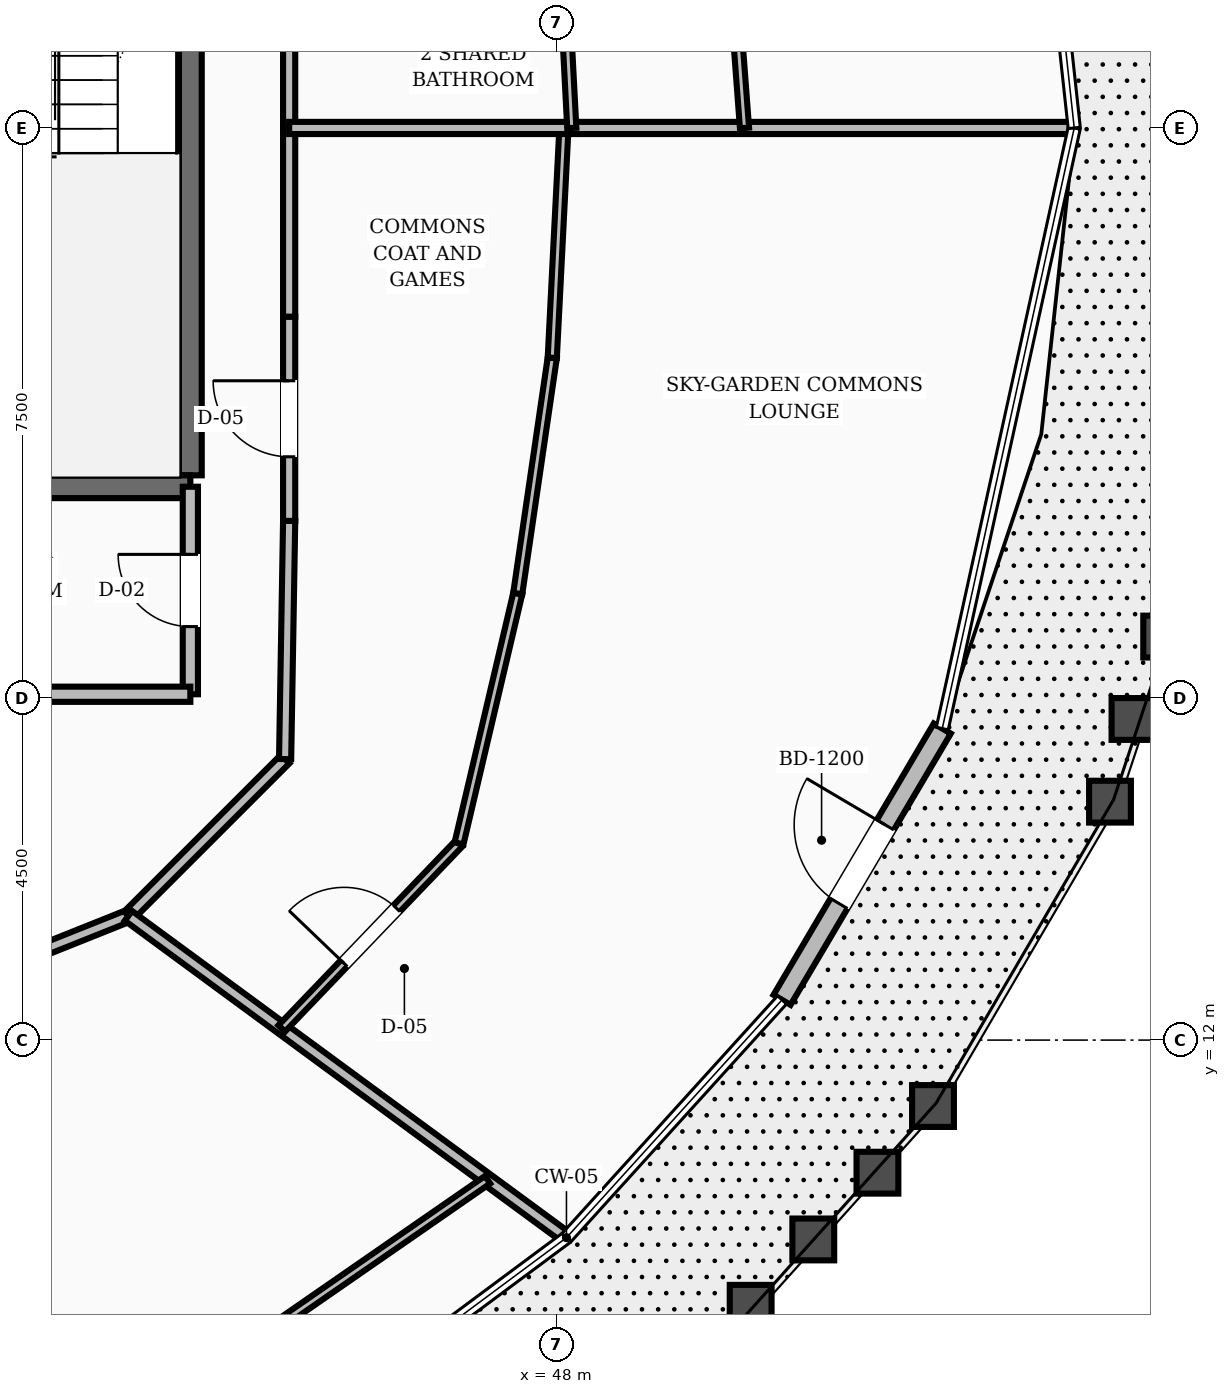
"""IFC4 building model, lengths in metres.
Left out: names, types, materials, properties, quantities, classifications, styles, units other than length and angle.
Written with IfcOpenShell. Run it as: python <this file> out.ifc"""

import sys

from ifc_helpers import new_model, si_unit, direction, frame, frame_2d, origin, place, context, subcontext, project, spatial, rectangle, extrude, element, fill, save


model = new_model("IFC4")
c1 = context("Model", 3, precision=1e-05, world=origin(), true_north=direction((0.0, 1.0)))
c2 = subcontext(c1, "Body", "Model", "MODEL_VIEW")
j1 = project(units=[si_unit("LENGTHUNIT", "METRE"), si_unit("PLANEANGLEUNIT", "RADIAN")], contexts=[c1])
p1 = place(None, origin())
s1 = spatial("IfcSite", under=j1, at=p1, CompositionType="ELEMENT")
p2 = place(p1, origin())
s2 = spatial("IfcBuilding", under=s1, at=p2, CompositionType="ELEMENT")
p3 = place(p2, frame((0.0, 0.0, 218.4)))
s3 = spatial("IfcBuildingStorey", under=s2, at=p3, CompositionType="ELEMENT", Elevation=218.4)
p4 = place(p3, frame((43.18, 19.43, 0.0), z_axis=(0.0, 0.0, 1.0), x_axis=(0.0, 1.0, 0.0)))
e1 = element("IfcWall", 1, at=p4, inside=s3, PredefinedType="SHEAR", context=c2, shape_type="SweptSolid", body=[
    extrude(rectangle(XDim=8.74, YDim=0.3, at=frame_2d((4.37, 0.0))), origin(), (0.0, 0.0, 1.0), 3.6),
])
p5 = place(p3, frame((39.58, 19.28, 0.0), z_axis=(0.0, 0.0, 1.0), x_axis=(1.0, 0.0, 0.0)))
e2 = element("IfcWall", 2, at=p5, inside=s3, PredefinedType="SHEAR", context=c2, shape_type="SweptSolid", body=[
    extrude(rectangle(XDim=3.6, YDim=0.3, at=frame_2d((1.8, 0.0))), origin(), (0.0, 0.0, 1.0), 3.6),
])
p6 = place(p3, frame((50.965, 12.529, 0.0), z_axis=(0.0, 0.0, 1.0), x_axis=(0.508481273456, 0.861073048321, 0.0)))
e3 = element("IfcWall", 3, at=p6, inside=s3, PredefinedType="STANDARD", context=c2, shape_type="SweptSolid", body=[
    extrude(rectangle(XDim=4.146, YDim=0.26, at=frame_2d((2.073, 0.0))), origin(), (0.0, 0.0, 1.0), 2.88),
])
p7 = place(p6, frame((1.473, 0.0, 0.0)))
e4 = element("IfcOpeningElement", 4, at=p7, cuts=e3, PredefinedType="OPENING", context=c2, shape_type="SweptSolid", body=[
    extrude(rectangle(XDim=1.2, YDim=2.15, at=frame_2d((0.6, 1.075))), frame((0.0, 0.14, 0.0), z_axis=(0.0, -1.0, 0.0), x_axis=(1.0, 0.0, 0.0)), (0.0, 0.0, 1.0), 0.28),
])
p8 = place(p3, frame((43.18, 16.55, 0.0), z_axis=(0.0, 0.0, 1.0), x_axis=(0.0, 1.0, 0.0)))
e5 = element("IfcWall", 5, at=p8, inside=s3, PredefinedType="SOLIDWALL", context=c2, shape_type="SweptSolid", body=[
    extrude(rectangle(XDim=2.73, YDim=0.2, at=frame_2d((1.365, 0.0))), origin(), (0.0, 0.0, 1.0), 2.87),
])
p9 = place(p8, frame((0.89, 0.0, 0.0)))
e6 = element("IfcOpeningElement", 6, at=p9, cuts=e5, PredefinedType="OPENING", context=c2, shape_type="SweptSolid", body=[
    extrude(rectangle(XDim=0.95, YDim=2.1, at=frame_2d((0.475, 1.05))), frame((0.0, 0.11, 0.0), z_axis=(0.0, -1.0, 0.0), x_axis=(1.0, 0.0, 0.0)), (0.0, 0.0, 1.0), 0.22),
])
p10 = place(p3, frame((39.2, 16.55, 0.0), z_axis=(0.0, 0.0, 1.0), x_axis=(1.0, 0.0, 0.0)))
e7 = element("IfcWall", 7, at=p10, inside=s3, PredefinedType="SOLIDWALL", context=c2, shape_type="SweptSolid", body=[
    extrude(rectangle(XDim=3.98, YDim=0.2, at=frame_2d((1.99, 0.0))), origin(), (0.0, 0.0, 1.0), 2.87),
])
p11 = place(p3, frame((44.48, 24.0, 0.0), z_axis=(0.0, 0.0, 1.0), x_axis=(0.0, 1.0, 0.0)))
e8 = element("IfcWall", 8, at=p11, inside=s3, PredefinedType="SOLIDWALL", context=c2, shape_type="SweptSolid", body=[
    extrude(rectangle(XDim=2.482, YDim=0.16, at=frame_2d((1.241, 0.0))), origin(), (0.0, 0.0, 1.0), 2.87),
])
p12 = place(p3, frame((39.651, 12.55, 0.0), z_axis=(0.0, 0.0, 1.0), x_axis=(0.92856882165, 0.371160266542, 0.0)))
e9 = element("IfcWall", 9, at=p12, inside=s3, PredefinedType="SOLIDWALL", context=c2, shape_type="SweptSolid", body=[
    extrude(rectangle(XDim=2.923, YDim=0.16, at=frame_2d((1.461, 0.0))), origin(), (0.0, 0.0, 1.0), 2.87),
])
p13 = place(p3, frame((42.365, 13.635, 0.0), z_axis=(0.0, 0.0, 1.0), x_axis=(0.707106781187, 0.707106781187, 0.0)))
e10 = element("IfcWall", 10, at=p13, inside=s3, PredefinedType="SOLIDWALL", context=c2, shape_type="SweptSolid", body=[
    extrude(rectangle(XDim=2.916, YDim=0.16, at=frame_2d((1.458, 0.0))), origin(), (0.0, 0.0, 1.0), 2.87),
])
p14 = place(p3, frame((44.427, 15.697, 0.0), z_axis=(0.0, 0.0, 1.0), x_axis=(0.016981035134, 0.999855811828, 0.0)))
e11 = element("IfcWall", 11, at=p14, inside=s3, PredefinedType="SOLIDWALL", context=c2, shape_type="SweptSolid", body=[
    extrude(rectangle(XDim=3.134, YDim=0.16, at=frame_2d((1.567, 0.0))), origin(), (0.0, 0.0, 1.0), 2.87),
])
p15 = place(p3, frame((44.48, 18.831, 0.0), z_axis=(0.0, 0.0, 1.0), x_axis=(0.0, 1.0, 0.0)))
e12 = element("IfcWall", 12, at=p15, inside=s3, PredefinedType="SOLIDWALL", context=c2, shape_type="SweptSolid", body=[
    extrude(rectangle(XDim=2.687, YDim=0.16, at=frame_2d((1.344, 0.0))), origin(), (0.0, 0.0, 1.0), 2.87),
])
p16 = place(p15, frame((0.844, 0.0, 0.0)))
e13 = element("IfcOpeningElement", 13, at=p16, cuts=e12, PredefinedType="OPENING", context=c2, shape_type="SweptSolid", body=[
    extrude(rectangle(XDim=1.0, YDim=2.1, at=frame_2d((0.5, 1.05))), frame((0.0, 0.09, 0.0), z_axis=(0.0, -1.0, 0.0), x_axis=(1.0, 0.0, 0.0)), (0.0, 0.0, 1.0), 0.18),
])
p17 = place(p3, frame((44.48, 21.518, 0.0), z_axis=(0.0, 0.0, 1.0), x_axis=(0.0, 1.0, 0.0)))
e14 = element("IfcWall", 14, at=p17, inside=s3, PredefinedType="SOLIDWALL", context=c2, shape_type="SweptSolid", body=[
    extrude(rectangle(XDim=2.482, YDim=0.16, at=frame_2d((1.241, 0.0))), origin(), (0.0, 0.0, 1.0), 2.87),
])
p18 = place(p3, frame((42.365, 13.635, 0.0), z_axis=(0.0, 0.0, 1.0), x_axis=(0.805864739579, -0.592099671933, 0.0)))
e15 = element("IfcWall", 15, at=p18, inside=s3, PredefinedType="SOLIDWALL", context=c2, shape_type="SweptSolid", body=[
    extrude(rectangle(XDim=7.102, YDim=0.16, at=frame_2d((3.551, 0.0))), origin(), (0.0, 0.0, 1.0), 2.87),
])
p19 = place(p3, frame((44.382, 12.153, 0.0), z_axis=(0.0, 0.0, 1.0), x_axis=(0.691814158677, 0.722075598435, 0.0)))
e16 = element("IfcWall", 16, at=p19, inside=s3, PredefinedType="PARTITIONING", context=c2, shape_type="SweptSolid", body=[
    extrude(rectangle(XDim=3.372, YDim=0.12, at=frame_2d((1.686, 0.0))), origin(), (0.0, 0.0, 1.0), 2.87),
])
p20 = place(p19, frame((1.186, 0.0, 0.0)))
e17 = element("IfcOpeningElement", 17, at=p20, cuts=e16, PredefinedType="OPENING", context=c2, shape_type="SweptSolid", body=[
    extrude(rectangle(XDim=1.0, YDim=2.1, at=frame_2d((0.5, 1.05))), frame((0.0, 0.07, 0.0), z_axis=(0.0, -1.0, 0.0), x_axis=(1.0, 0.0, 0.0)), (0.0, 0.0, 1.0), 0.14),
])
p21 = place(p3, frame((46.715, 14.588, 0.0), z_axis=(0.0, 0.0, 1.0), x_axis=(0.228745067829, 0.97348636043, 0.0)))
e18 = element("IfcWall", 18, at=p21, inside=s3, PredefinedType="PARTITIONING", context=c2, shape_type="SweptSolid", body=[
    extrude(rectangle(XDim=3.376, YDim=0.12, at=frame_2d((1.688, 0.0))), origin(), (0.0, 0.0, 1.0), 2.87),
])
p22 = place(p3, frame((47.487, 17.875, 0.0), z_axis=(0.0, 0.0, 1.0), x_axis=(0.144920046389, 0.989443368847, 0.0)))
e19 = element("IfcWall", 19, at=p22, inside=s3, PredefinedType="PARTITIONING", context=c2, shape_type="SweptSolid", body=[
    extrude(rectangle(XDim=3.135, YDim=0.12, at=frame_2d((1.568, 0.0))), origin(), (0.0, 0.0, 1.0), 2.87),
])
p23 = place(p3, frame((47.942, 20.977, 0.0), z_axis=(0.0, 0.0, 1.0), x_axis=(0.050645517022, 0.998716692364, 0.0)))
e20 = element("IfcWall", 20, at=p23, inside=s3, PredefinedType="PARTITIONING", context=c2, shape_type="SweptSolid", body=[
    extrude(rectangle(XDim=3.027, YDim=0.12, at=frame_2d((1.514, 0.0))), origin(), (0.0, 0.0, 1.0), 2.87),
])
p24 = place(p3, frame((44.48, 24.0, 0.0), z_axis=(0.0, 0.0, 1.0), x_axis=(1.0, 0.0, 0.0)))
e21 = element("IfcWall", 21, at=p24, inside=s3, PredefinedType="SOLIDWALL", context=c2, shape_type="SweptSolid", body=[
    extrude(rectangle(XDim=10.279, YDim=0.16, at=frame_2d((5.139, 0.0))), origin(), (0.0, 0.0, 1.0), 2.87),
])
p25 = place(p3, frame((48.198, 24.0, 0.0), z_axis=(0.0, 0.0, 1.0), x_axis=(-0.051830297727, 0.998655906826, 0.0)))
e22 = element("IfcWall", 22, at=p25, inside=s3, PredefinedType="PARTITIONING", context=c2, shape_type="SweptSolid", body=[
    extrude(rectangle(XDim=3.043, YDim=0.12, at=frame_2d((1.521, 0.0))), origin(), (0.0, 0.0, 1.0), 2.87),
])
p26 = place(p3, frame((50.471, 24.0, 0.0), z_axis=(0.0, 0.0, 1.0), x_axis=(-0.075076534755, 0.997177774486, 0.0)))
e23 = element("IfcWall", 23, at=p26, inside=s3, PredefinedType="PARTITIONING", context=c2, shape_type="SweptSolid", body=[
    extrude(rectangle(XDim=3.388, YDim=0.12, at=frame_2d((1.694, 0.0))), origin(), (0.0, 0.0, 1.0), 2.87),
])
p27 = place(p26, frame((1.219, 0.0, 0.0)))
e24 = element("IfcOpeningElement", 24, at=p27, cuts=e23, PredefinedType="OPENING", context=c2, shape_type="SweptSolid", body=[
    extrude(rectangle(XDim=0.95, YDim=2.1, at=frame_2d((0.475, 1.05))), frame((0.0, 0.07, 0.0), z_axis=(0.0, -1.0, 0.0), x_axis=(1.0, 0.0, 0.0)), (0.0, 0.0, 1.0), 0.14),
])
p28 = place(p3, frame((43.768, 7.862, 0.0), z_axis=(0.0, 0.0, 1.0), x_axis=(0.8221443461, 0.569279082854, 0.0)))
e25 = element("IfcWall", 25, at=p28, inside=s3, PredefinedType="PARTITIONING", context=c2, shape_type="SweptSolid", body=[
    extrude(rectangle(XDim=4.042, YDim=0.12, at=frame_2d((2.021, 0.0))), origin(), (0.0, 0.0, 1.0), 2.87),
])
p29 = place(p7, origin())
e26 = element("IfcDoor", 26, at=p29, inside=s3, OperationType="SINGLE_SWING_RIGHT", PredefinedType="DOOR", context=c2, shape_type="SweptSolid", body=[
    extrude(rectangle(XDim=1.2, YDim=2.15, at=frame_2d((0.6, 1.075))), frame((0.0, 0.025, 0.0), z_axis=(0.0, -1.0, 0.0), x_axis=(1.0, 0.0, 0.0)), (0.0, 0.0, 1.0), 0.05),
])
fill(e4, e26)
p30 = place(p9, origin())
e27 = element("IfcDoor", 27, at=p30, inside=s3, OperationType="SINGLE_SWING_RIGHT", PredefinedType="DOOR", context=c2, shape_type="SweptSolid", body=[
    extrude(rectangle(XDim=0.95, YDim=2.1, at=frame_2d((0.475, 1.05))), frame((0.0, 0.025, 0.0), z_axis=(0.0, -1.0, 0.0), x_axis=(1.0, 0.0, 0.0)), (0.0, 0.0, 1.0), 0.05),
])
fill(e6, e27)
p31 = place(p16, origin())
e28 = element("IfcDoor", 28, at=p31, inside=s3, OperationType="SINGLE_SWING_RIGHT", PredefinedType="DOOR", context=c2, shape_type="SweptSolid", body=[
    extrude(rectangle(XDim=1.0, YDim=2.1, at=frame_2d((0.5, 1.05))), frame((0.0, 0.025, 0.0), z_axis=(0.0, -1.0, 0.0), x_axis=(1.0, 0.0, 0.0)), (0.0, 0.0, 1.0), 0.05),
])
fill(e13, e28)
p32 = place(p20, origin())
e29 = element("IfcDoor", 29, at=p32, inside=s3, OperationType="SINGLE_SWING_LEFT", PredefinedType="DOOR", context=c2, shape_type="SweptSolid", body=[
    extrude(rectangle(XDim=1.0, YDim=2.1, at=frame_2d((0.5, 1.05))), frame((0.0, 0.025, 0.0), z_axis=(0.0, -1.0, 0.0), x_axis=(1.0, 0.0, 0.0)), (0.0, 0.0, 1.0), 0.05),
])
fill(e17, e29)
save(model, sys.argv[1])
